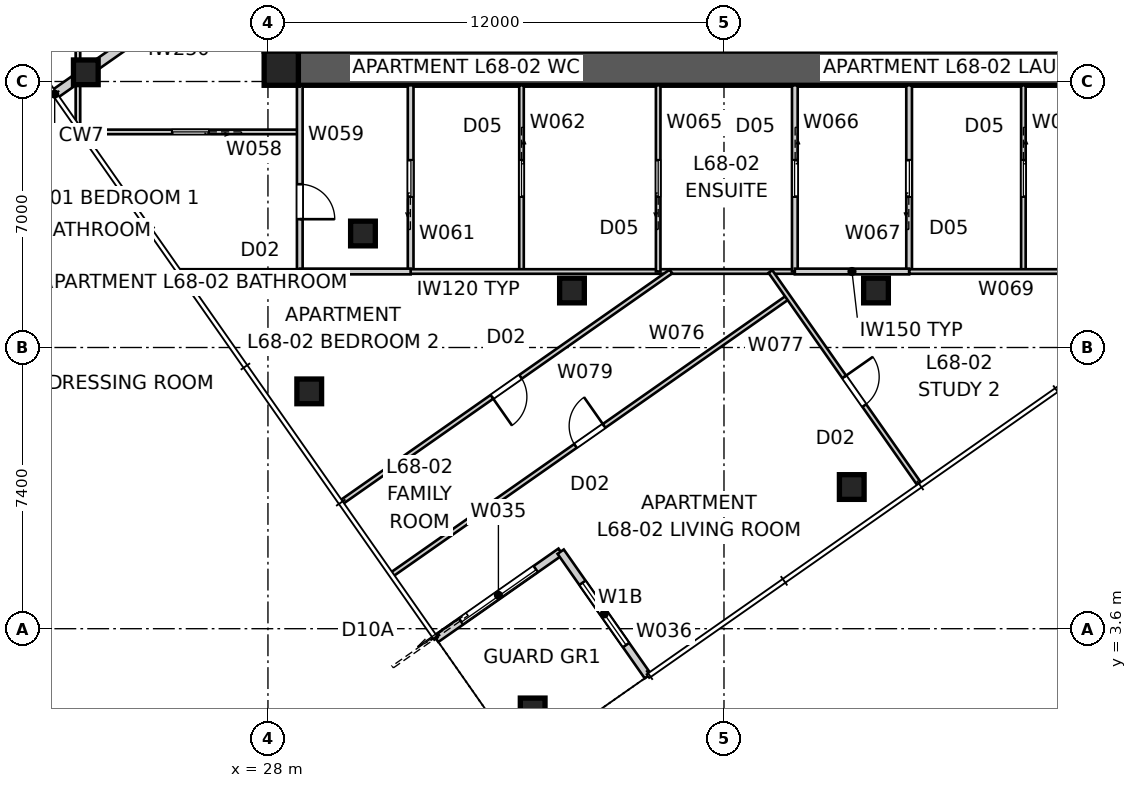
"""IFC4 building model, lengths in metres.
Left out: names, types, materials, properties, quantities, classifications, styles, units other than length and angle.
Written with IfcOpenShell. Run it as: python <this file> out.ifc"""

import sys

from ifc_helpers import new_model, si_unit, direction, frame, frame_2d, origin, origin_2d, place, context, subcontext, project, spatial, polyline, rectangle, outline, extrude, element, fill, save


model = new_model("IFC4")
c1 = context("Model", 3, precision=1e-05, world=origin(), true_north=direction((0.0, 1.0)))
c2 = subcontext(c1, "Body", "Model", "MODEL_VIEW")
j1 = project(units=[si_unit("LENGTHUNIT", "METRE"), si_unit("PLANEANGLEUNIT", "RADIAN")], contexts=[c1])
p1 = place(None, origin())
s1 = spatial("IfcSite", under=j1, at=p1, CompositionType="ELEMENT")
p2 = place(p1, origin())
s2 = spatial("IfcBuilding", under=s1, at=p2, CompositionType="ELEMENT")
p3 = place(p2, frame((0.0, 0.0, 247.2)))
s3 = spatial("IfcBuildingStorey", under=s2, at=p3, CompositionType="ELEMENT", Elevation=247.2)
p4 = place(p3, frame((51.2, 18.35, 0.0), z_axis=(0.0, 0.0, 1.0), x_axis=(-1.0, 0.0, 0.0)))
e1 = element("IfcWall", 1, at=p4, inside=s3, PredefinedType="SHEAR", context=c2, shape_type="SweptSolid", body=[
    extrude(outline(polyline([(0.0, -0.45), (22.4, -0.45), (22.4, -0.025), (22.85, -0.025), (22.85, 0.025), (22.4, 0.025), (22.4, 0.45), (0.0, 0.45), (0.0, 0.025), (-0.45, 0.025), (-0.45, -0.025), (0.0, -0.025), (0.0, -0.45)])), origin(), (0.0, 0.0, 1.0), 3.4),
])
p5 = place(p3, frame((28.35, 41.2, 0.0), z_axis=(0.0, 0.0, 1.0), x_axis=(0.0, -1.0, 0.0)))
e2 = element("IfcWall", 2, at=p5, inside=s3, PredefinedType="SHEAR", context=c2, shape_type="SweptSolid", body=[
    extrude(outline(polyline([(0.0, -0.45), (22.4, -0.45), (22.4, -0.025), (22.85, -0.025), (22.85, 0.025), (22.4, 0.025), (22.4, 0.45), (0.0, 0.45), (0.0, 0.025), (-0.45, 0.025), (-0.45, -0.025), (0.0, -0.025), (0.0, -0.45)])), origin(), (0.0, 0.0, 1.0), 3.4),
])
p6 = place(p5, frame((11.14, 0.0, 0.0)))
e3 = element("IfcOpeningElement", 3, at=p6, cuts=e2, PredefinedType="OPENING", context=c2, shape_type="SweptSolid", body=[
    extrude(rectangle(XDim=1.02, YDim=2.4, at=frame_2d((0.51, 1.2))), frame((0.0, 0.46, 0.0), z_axis=(0.0, -1.0, 0.0), x_axis=(1.0, 0.0, 0.0)), (0.0, 0.0, 1.0), 0.92),
])
p7 = place(p3, frame((28.35, 18.35, 0.0), z_axis=(0.0, 0.0, 1.0), x_axis=(1.0, 0.0, 0.0)))
e4 = element("IfcColumn", 4, at=p7, inside=s3, PredefinedType="COLUMN", context=c2, shape_type="SweptSolid", body=[
    extrude(rectangle(XDim=0.9, YDim=0.9, at=origin_2d()), origin(), (0.0, 0.0, 1.0), 3.4),
])
for number, where, z_axis, x_axis in (
    (5, (34.966, 1.449, 0.0), (0.0, 0.0, 1.0), (1.0, 0.0, 0.0)),
    (6, (43.362, 7.328, 0.0), (0.0, 0.0, 1.0), (1.0, 0.0, 0.0)),
    (7, (23.207, 18.242, 0.0), (0.0, 0.0, 1.0), (1.0, 0.0, 0.0)),
    (8, (29.086, 9.845, 0.0), (0.0, 0.0, 1.0), (1.0, 0.0, 0.0)),
    (9, (30.5, 14.0, 0.0), (0.0, 0.0, 1.0), (1.0, 0.0, 0.0)),
    (10, (36.0, 12.5, 0.0), (0.0, 0.0, 1.0), (1.0, 0.0, 0.0)),
    (11, (44.0, 12.5, 0.0), (0.0, 0.0, 1.0), (1.0, 0.0, 0.0)),
):
    element("IfcColumn", number, at=place(p3, frame(where, z_axis=z_axis, x_axis=x_axis)), inside=s3, PredefinedType="COLUMN", context=c2, shape_type="SweptSolid", body=[
        extrude(rectangle(XDim=0.65, YDim=0.65, at=origin_2d()), origin(), (0.0, 0.0, 1.0), 3.4),
    ])
p8 = place(p3, frame((32.426, 3.333, 0.0), z_axis=(0.0, 0.0, 1.0), x_axis=(0.819165963305, 0.573556557423, 0.0)))
e12 = element("IfcWall", 12, at=p8, inside=s3, PredefinedType="SOLIDWALL", context=c2, shape_type="SweptSolid", body=[
    extrude(rectangle(XDim=4.0, YDim=0.2, at=frame_2d((2.0, 0.0))), origin(), (0.0, 0.0, 1.0), 3.25),
])
p9 = place(p8, frame((0.8, 0.0, 0.0)))
e13 = element("IfcOpeningElement", 13, at=p9, cuts=e12, PredefinedType="OPENING", context=c2, shape_type="SweptSolid", body=[
    extrude(rectangle(XDim=2.4, YDim=2.1, at=frame_2d((1.2, 1.05))), frame((0.0, 0.11, 0.0), z_axis=(0.0, -1.0, 0.0), x_axis=(1.0, 0.0, 0.0)), (0.0, 0.0, 1.0), 0.22),
])
p10 = place(p3, frame((35.702, 5.627, 0.0), z_axis=(0.0, 0.0, 1.0), x_axis=(0.573597512525, -0.819137286189, 0.0)))
e14 = element("IfcWall", 14, at=p10, inside=s3, PredefinedType="SOLIDWALL", context=c2, shape_type="SweptSolid", body=[
    extrude(rectangle(XDim=4.0, YDim=0.2, at=frame_2d((2.0, 0.0))), origin(), (0.0, 0.0, 1.0), 3.25),
])
p11 = place(p10, frame((1.0, 0.0, 0.45)))
e15 = element("IfcOpeningElement", 15, at=p11, cuts=e14, PredefinedType="OPENING", context=c2, shape_type="SweptSolid", body=[
    extrude(rectangle(XDim=2.0, YDim=1.8, at=frame_2d((1.0, 0.9))), frame((0.0, 0.11, 0.0), z_axis=(0.0, -1.0, 0.0), x_axis=(1.0, 0.0, 0.0)), (0.0, 0.0, 1.0), 0.22),
])
p12 = place(p3, frame((22.388, 17.668, 0.0), z_axis=(0.0, 0.0, 1.0), x_axis=(0.819161528122, 0.573562891796, 0.0)))
e16 = element("IfcWall", 16, at=p12, inside=s3, PredefinedType="PARTITIONING", context=c2, shape_type="SweptSolid", body=[
    extrude(rectangle(XDim=6.681, YDim=0.25, at=frame_2d((3.341, 0.0))), origin(), (0.0, 0.0, 1.0), 3.25),
])
p13 = place(p3, frame((23.0, 16.864, 0.0), z_axis=(0.0, 0.0, 1.0), x_axis=(0.0, 1.0, 0.0)))
e17 = element("IfcWall", 17, at=p13, inside=s3, PredefinedType="PARTITIONING", context=c2, shape_type="SweptSolid", body=[
    extrude(rectangle(XDim=26.824, YDim=0.12, at=frame_2d((13.412, 0.0))), origin(), (0.0, 0.0, 1.0), 2.55),
])
p14 = place(p13, frame((9.599, 0.0, 0.0)))
e18 = element("IfcOpeningElement", 18, at=p14, cuts=e17, PredefinedType="OPENING", context=c2, shape_type="SweptSolid", body=[
    extrude(rectangle(XDim=0.92, YDim=2.34, at=frame_2d((0.46, 1.17))), frame((0.0, 0.07, 0.0), z_axis=(0.0, -1.0, 0.0), x_axis=(1.0, 0.0, 0.0)), (0.0, 0.0, 1.0), 0.14),
])
p15 = place(p13, frame((17.603, 0.0, 0.0)))
e19 = element("IfcOpeningElement", 19, at=p15, cuts=e17, PredefinedType="OPENING", context=c2, shape_type="SweptSolid", body=[
    extrude(rectangle(XDim=0.92, YDim=2.34, at=frame_2d((0.46, 1.17))), frame((0.0, 0.07, 0.0), z_axis=(0.0, -1.0, 0.0), x_axis=(1.0, 0.0, 0.0)), (0.0, 0.0, 1.0), 0.14),
])
p16 = place(p13, frame((12.806, 0.0, 0.0)))
e20 = element("IfcOpeningElement", 20, at=p16, cuts=e17, PredefinedType="OPENING", context=c2, shape_type="SweptSolid", body=[
    extrude(rectangle(XDim=0.92, YDim=2.34, at=frame_2d((0.46, 1.17))), frame((0.0, 0.07, 0.0), z_axis=(0.0, -1.0, 0.0), x_axis=(1.0, 0.0, 0.0)), (0.0, 0.0, 1.0), 0.14),
])
p17 = place(p3, frame((28.837, 16.673, 0.0), z_axis=(0.0, 0.0, 1.0), x_axis=(-1.0, 0.0, 0.0)))
e21 = element("IfcWall", 21, at=p17, inside=s3, PredefinedType="PARTITIONING", context=c2, shape_type="SweptSolid", body=[
    extrude(rectangle(XDim=5.704, YDim=0.12, at=frame_2d((2.852, 0.0))), origin(), (0.0, 0.0, 1.0), 3.25),
])
p18 = place(p17, frame((2.396, 0.0, 0.0)))
e22 = element("IfcOpeningElement", 22, at=p18, cuts=e21, PredefinedType="OPENING", context=c2, shape_type="SweptSolid", body=[
    extrude(rectangle(XDim=0.96, YDim=2.1, at=frame_2d((0.48, 1.05))), frame((0.0, 0.07, 0.0), z_axis=(0.0, -1.0, 0.0), x_axis=(1.0, 0.0, 0.0)), (0.0, 0.0, 1.0), 0.14),
])
p19 = place(p3, frame((28.837, 17.9, 0.0), z_axis=(0.0, 0.0, 1.0), x_axis=(0.0, -1.0, 0.0)))
e23 = element("IfcWall", 23, at=p19, inside=s3, PredefinedType="SOLIDWALL", context=c2, shape_type="SweptSolid", body=[
    extrude(rectangle(XDim=4.9, YDim=0.15, at=frame_2d((2.45, 0.0))), origin(), (0.0, 0.0, 1.0), 3.25),
])
p20 = place(p19, frame((2.603, 0.0, 0.0)))
e24 = element("IfcOpeningElement", 24, at=p20, cuts=e23, PredefinedType="OPENING", context=c2, shape_type="SweptSolid", body=[
    extrude(rectangle(XDim=0.92, YDim=2.34, at=frame_2d((0.46, 1.17))), frame((0.0, 0.085, 0.0), z_axis=(0.0, -1.0, 0.0), x_axis=(1.0, 0.0, 0.0)), (0.0, 0.0, 1.0), 0.17),
])
p21 = place(p3, frame((28.837, 13.0, 0.0), z_axis=(0.0, 0.0, 1.0), x_axis=(-1.0, 0.0, 0.0)))
e25 = element("IfcWall", 25, at=p21, inside=s3, PredefinedType="PARTITIONING", context=c2, shape_type="SweptSolid", body=[
    extrude(rectangle(XDim=3.132, YDim=0.12, at=frame_2d((1.566, 0.0))), origin(), (0.0, 0.0, 1.0), 3.25),
])
p22 = place(p3, frame((31.755, 13.0, 0.0), z_axis=(0.0, 0.0, 1.0), x_axis=(0.0, 1.0, 0.0)))
e26 = element("IfcWall", 26, at=p22, inside=s3, PredefinedType="SOLIDWALL", context=c2, shape_type="SweptSolid", body=[
    extrude(rectangle(XDim=4.9, YDim=0.15, at=frame_2d((2.45, 0.0))), origin(), (0.0, 0.0, 1.0), 3.25),
])
p23 = place(p22, frame((1.97, 0.0, 0.0)))
e27 = element("IfcOpeningElement", 27, at=p23, cuts=e26, PredefinedType="OPENING", context=c2, shape_type="SweptSolid", body=[
    extrude(rectangle(XDim=0.96, YDim=2.1, at=frame_2d((0.48, 1.05))), frame((0.0, 0.085, 0.0), z_axis=(0.0, -1.0, 0.0), x_axis=(1.0, 0.0, 0.0)), (0.0, 0.0, 1.0), 0.17),
])
p24 = place(p3, frame((34.672, 17.9, 0.0), z_axis=(0.0, 0.0, 1.0), x_axis=(0.0, -1.0, 0.0)))
e28 = element("IfcWall", 28, at=p24, inside=s3, PredefinedType="PARTITIONING", context=c2, shape_type="SweptSolid", body=[
    extrude(rectangle(XDim=4.9, YDim=0.12, at=frame_2d((2.45, 0.0))), origin(), (0.0, 0.0, 1.0), 3.25),
])
p25 = place(p24, frame((1.97, 0.0, 0.0)))
e29 = element("IfcOpeningElement", 29, at=p25, cuts=e28, PredefinedType="OPENING", context=c2, shape_type="SweptSolid", body=[
    extrude(rectangle(XDim=0.96, YDim=2.1, at=frame_2d((0.48, 1.05))), frame((0.0, 0.07, 0.0), z_axis=(0.0, -1.0, 0.0), x_axis=(1.0, 0.0, 0.0)), (0.0, 0.0, 1.0), 0.14),
])
p26 = place(p3, frame((41.865, 13.0, 0.0), z_axis=(0.0, 0.0, 1.0), x_axis=(-1.0, 0.0, 0.0)))
e30 = element("IfcWall", 30, at=p26, inside=s3, PredefinedType="PARTITIONING", context=c2, shape_type="SweptSolid", body=[
    extrude(rectangle(XDim=10.11, YDim=0.12, at=frame_2d((5.055, 0.0))), origin(), (0.0, 0.0, 1.0), 2.55),
])
p27 = place(p3, frame((31.755, 13.0, 0.0), z_axis=(0.0, 0.0, 1.0), x_axis=(-1.0, 0.0, 0.0)))
e31 = element("IfcWall", 31, at=p27, inside=s3, PredefinedType="SOLIDWALL", context=c2, shape_type="SweptSolid", body=[
    extrude(rectangle(XDim=2.917, YDim=0.15, at=frame_2d((1.458, 0.0))), origin(), (0.0, 0.0, 1.0), 3.25),
])
p28 = place(p3, frame((38.268, 13.0, 0.0), z_axis=(0.0, 0.0, 1.0), x_axis=(0.0, 1.0, 0.0)))
e32 = element("IfcWall", 32, at=p28, inside=s3, PredefinedType="PARTITIONING", context=c2, shape_type="SweptSolid", body=[
    extrude(rectangle(XDim=4.9, YDim=0.12, at=frame_2d((2.45, 0.0))), origin(), (0.0, 0.0, 1.0), 3.25),
])
p29 = place(p28, frame((1.97, 0.0, 0.0)))
e33 = element("IfcOpeningElement", 33, at=p29, cuts=e32, PredefinedType="OPENING", context=c2, shape_type="SweptSolid", body=[
    extrude(rectangle(XDim=0.96, YDim=2.1, at=frame_2d((0.48, 1.05))), frame((0.0, 0.07, 0.0), z_axis=(0.0, -1.0, 0.0), x_axis=(1.0, 0.0, 0.0)), (0.0, 0.0, 1.0), 0.14),
])
p30 = place(p3, frame((41.865, 17.9, 0.0), z_axis=(0.0, 0.0, 1.0), x_axis=(0.0, -1.0, 0.0)))
e34 = element("IfcWall", 34, at=p30, inside=s3, PredefinedType="SOLIDWALL", context=c2, shape_type="SweptSolid", body=[
    extrude(rectangle(XDim=4.9, YDim=0.15, at=frame_2d((2.45, 0.0))), origin(), (0.0, 0.0, 1.0), 3.25),
])
p31 = place(p30, frame((1.97, 0.0, 0.0)))
e35 = element("IfcOpeningElement", 35, at=p31, cuts=e34, PredefinedType="OPENING", context=c2, shape_type="SweptSolid", body=[
    extrude(rectangle(XDim=0.96, YDim=2.1, at=frame_2d((0.48, 1.05))), frame((0.0, 0.085, 0.0), z_axis=(0.0, -1.0, 0.0), x_axis=(1.0, 0.0, 0.0)), (0.0, 0.0, 1.0), 0.17),
])
p32 = place(p3, frame((44.871, 13.0, 0.0), z_axis=(0.0, 0.0, 1.0), x_axis=(0.0, 1.0, 0.0)))
e36 = element("IfcWall", 36, at=p32, inside=s3, PredefinedType="SOLIDWALL", context=c2, shape_type="SweptSolid", body=[
    extrude(rectangle(XDim=4.9, YDim=0.15, at=frame_2d((2.45, 0.0))), origin(), (0.0, 0.0, 1.0), 3.25),
])
p33 = place(p32, frame((1.97, 0.0, 0.0)))
e37 = element("IfcOpeningElement", 37, at=p33, cuts=e36, PredefinedType="OPENING", context=c2, shape_type="SweptSolid", body=[
    extrude(rectangle(XDim=0.96, YDim=2.1, at=frame_2d((0.48, 1.05))), frame((0.0, 0.085, 0.0), z_axis=(0.0, -1.0, 0.0), x_axis=(1.0, 0.0, 0.0)), (0.0, 0.0, 1.0), 0.17),
])
p34 = place(p3, frame((47.878, 17.9, 0.0), z_axis=(0.0, 0.0, 1.0), x_axis=(0.0, -1.0, 0.0)))
e38 = element("IfcWall", 38, at=p34, inside=s3, PredefinedType="PARTITIONING", context=c2, shape_type="SweptSolid", body=[
    extrude(rectangle(XDim=4.9, YDim=0.12, at=frame_2d((2.45, 0.0))), origin(), (0.0, 0.0, 1.0), 3.25),
])
p35 = place(p34, frame((1.97, 0.0, 0.0)))
e39 = element("IfcOpeningElement", 39, at=p35, cuts=e38, PredefinedType="OPENING", context=c2, shape_type="SweptSolid", body=[
    extrude(rectangle(XDim=0.96, YDim=2.1, at=frame_2d((0.48, 1.05))), frame((0.0, 0.07, 0.0), z_axis=(0.0, -1.0, 0.0), x_axis=(1.0, 0.0, 0.0)), (0.0, 0.0, 1.0), 0.14),
])
p36 = place(p3, frame((52.109, 13.0, 0.0), z_axis=(0.0, 0.0, 1.0), x_axis=(-1.0, 0.0, 0.0)))
e40 = element("IfcWall", 40, at=p36, inside=s3, PredefinedType="PARTITIONING", context=c2, shape_type="SweptSolid", body=[
    extrude(rectangle(XDim=7.238, YDim=0.12, at=frame_2d((3.619, 0.0))), origin(), (0.0, 0.0, 1.0), 2.55),
])
p37 = place(p36, frame((1.205, 0.0, 0.0)))
e41 = element("IfcOpeningElement", 41, at=p37, cuts=e40, PredefinedType="OPENING", context=c2, shape_type="SweptSolid", body=[
    extrude(rectangle(XDim=0.92, YDim=2.34, at=frame_2d((0.46, 1.17))), frame((0.0, 0.07, 0.0), z_axis=(0.0, -1.0, 0.0), x_axis=(1.0, 0.0, 0.0)), (0.0, 0.0, 1.0), 0.14),
])
p38 = place(p3, frame((44.871, 13.0, 0.0), z_axis=(0.0, 0.0, 1.0), x_axis=(-1.0, 0.0, 0.0)))
e42 = element("IfcWall", 42, at=p38, inside=s3, PredefinedType="SOLIDWALL", context=c2, shape_type="SweptSolid", body=[
    extrude(rectangle(XDim=3.007, YDim=0.15, at=frame_2d((1.503, 0.0))), origin(), (0.0, 0.0, 1.0), 3.25),
])
p39 = place(p3, frame((31.279, 5.04, 0.0), z_axis=(0.0, 0.0, 1.0), x_axis=(0.819155207289, 0.573571919092, 0.0)))
e43 = element("IfcWall", 43, at=p39, inside=s3, PredefinedType="PARTITIONING", context=c2, shape_type="SweptSolid", body=[
    extrude(rectangle(XDim=12.71, YDim=0.12, at=frame_2d((6.355, 0.0))), origin(), (0.0, 0.0, 1.0), 2.717),
])
p40 = place(p39, frame((5.875, 0.0, 0.0)))
e44 = element("IfcOpeningElement", 44, at=p40, cuts=e43, PredefinedType="OPENING", context=c2, shape_type="SweptSolid", body=[
    extrude(rectangle(XDim=0.92, YDim=2.34, at=frame_2d((0.46, 1.17))), frame((0.0, 0.07, 0.0), z_axis=(0.0, -1.0, 0.0), x_axis=(1.0, 0.0, 0.0)), (0.0, 0.0, 1.0), 0.14),
])
p41 = place(p3, frame((41.222, 13.0, 0.0), z_axis=(0.0, 0.0, 1.0), x_axis=(0.57357503053, -0.819153028653, 0.0)))
e45 = element("IfcWall", 45, at=p41, inside=s3, PredefinedType="PARTITIONING", context=c2, shape_type="SweptSolid", body=[
    extrude(rectangle(XDim=6.834, YDim=0.12, at=frame_2d((3.417, 0.0))), origin(), (0.0, 0.0, 1.0), 3.25),
])
p42 = place(p41, frame((3.386, 0.0, 0.0)))
e46 = element("IfcOpeningElement", 46, at=p42, cuts=e45, PredefinedType="OPENING", context=c2, shape_type="SweptSolid", body=[
    extrude(rectangle(XDim=0.92, YDim=2.34, at=frame_2d((0.46, 1.17))), frame((0.0, 0.07, 0.0), z_axis=(0.0, -1.0, 0.0), x_axis=(1.0, 0.0, 0.0)), (0.0, 0.0, 1.0), 0.14),
])
p43 = place(p3, frame((38.604, 13.0, 0.0), z_axis=(0.0, 0.0, 1.0), x_axis=(-0.819123352089, -0.573617410878, 0.0)))
e47 = element("IfcWall", 47, at=p43, inside=s3, PredefinedType="PARTITIONING", context=c2, shape_type="SweptSolid", body=[
    extrude(rectangle(XDim=10.566, YDim=0.12, at=frame_2d((5.283, 0.0))), origin(), (0.0, 0.0, 1.0), 3.25),
])
p44 = place(p43, frame((4.831, 0.0, 0.0)))
e48 = element("IfcOpeningElement", 48, at=p44, cuts=e47, PredefinedType="OPENING", context=c2, shape_type="SweptSolid", body=[
    extrude(rectangle(XDim=0.92, YDim=2.34, at=frame_2d((0.46, 1.17))), frame((0.0, 0.07, 0.0), z_axis=(0.0, -1.0, 0.0), x_axis=(1.0, 0.0, 0.0)), (0.0, 0.0, 1.0), 0.14),
])
p45 = place(p9, origin())
e49 = element("IfcDoor", 49, at=p45, inside=s3, OperationType="SLIDING_TO_LEFT", PredefinedType="DOOR", context=c2, shape_type="SweptSolid", body=[
    extrude(rectangle(XDim=2.4, YDim=2.1, at=frame_2d((1.2, 1.05))), frame((0.0, 0.025, 0.0), z_axis=(0.0, -1.0, 0.0), x_axis=(1.0, 0.0, 0.0)), (0.0, 0.0, 1.0), 0.05),
])
fill(e13, e49)
p46 = place(p11, origin())
e50 = element("IfcWindow", 50, at=p46, inside=s3, PartitioningType="SINGLE_PANEL", PredefinedType="WINDOW", context=c2, shape_type="SweptSolid", body=[
    extrude(rectangle(XDim=2.0, YDim=1.8, at=frame_2d((1.0, 0.9))), frame((0.0, 0.03, 0.0), z_axis=(0.0, -1.0, 0.0), x_axis=(1.0, 0.0, 0.0)), (0.0, 0.0, 1.0), 0.06),
])
fill(e15, e50)
p47 = place(p35, origin())
e51 = element("IfcDoor", 51, at=p47, inside=s3, OperationType="SLIDING_TO_LEFT", PredefinedType="DOOR", context=c2, shape_type="SweptSolid", body=[
    extrude(rectangle(XDim=0.96, YDim=2.1, at=frame_2d((0.48, 1.05))), frame((0.0, 0.025, 0.0), z_axis=(0.0, -1.0, 0.0), x_axis=(1.0, 0.0, 0.0)), (0.0, 0.0, 1.0), 0.05),
])
fill(e39, e51)
p48 = place(p33, origin())
e52 = element("IfcDoor", 52, at=p48, inside=s3, OperationType="SLIDING_TO_LEFT", PredefinedType="DOOR", context=c2, shape_type="SweptSolid", body=[
    extrude(rectangle(XDim=0.96, YDim=2.1, at=frame_2d((0.48, 1.05))), frame((0.0, 0.025, 0.0), z_axis=(0.0, -1.0, 0.0), x_axis=(1.0, 0.0, 0.0)), (0.0, 0.0, 1.0), 0.05),
])
fill(e37, e52)
p49 = place(p42, origin())
e53 = element("IfcDoor", 53, at=p49, inside=s3, OperationType="SINGLE_SWING_LEFT", PredefinedType="DOOR", context=c2, shape_type="SweptSolid", body=[
    extrude(rectangle(XDim=0.92, YDim=2.34, at=frame_2d((0.46, 1.17))), frame((0.0, 0.025, 0.0), z_axis=(0.0, -1.0, 0.0), x_axis=(1.0, 0.0, 0.0)), (0.0, 0.0, 1.0), 0.05),
])
fill(e46, e53)
p50 = place(p31, origin())
e54 = element("IfcDoor", 54, at=p50, inside=s3, OperationType="SLIDING_TO_LEFT", PredefinedType="DOOR", context=c2, shape_type="SweptSolid", body=[
    extrude(rectangle(XDim=0.96, YDim=2.1, at=frame_2d((0.48, 1.05))), frame((0.0, 0.025, 0.0), z_axis=(0.0, -1.0, 0.0), x_axis=(1.0, 0.0, 0.0)), (0.0, 0.0, 1.0), 0.05),
])
fill(e35, e54)
p51 = place(p40, origin())
e55 = element("IfcDoor", 55, at=p51, inside=s3, OperationType="SINGLE_SWING_RIGHT", PredefinedType="DOOR", context=c2, shape_type="SweptSolid", body=[
    extrude(rectangle(XDim=0.92, YDim=2.34, at=frame_2d((0.46, 1.17))), frame((0.0, 0.025, 0.0), z_axis=(0.0, -1.0, 0.0), x_axis=(1.0, 0.0, 0.0)), (0.0, 0.0, 1.0), 0.05),
])
fill(e44, e55)
p52 = place(p29, origin())
e56 = element("IfcDoor", 56, at=p52, inside=s3, OperationType="SLIDING_TO_LEFT", PredefinedType="DOOR", context=c2, shape_type="SweptSolid", body=[
    extrude(rectangle(XDim=0.96, YDim=2.1, at=frame_2d((0.48, 1.05))), frame((0.0, 0.025, 0.0), z_axis=(0.0, -1.0, 0.0), x_axis=(1.0, 0.0, 0.0)), (0.0, 0.0, 1.0), 0.05),
])
fill(e33, e56)
p53 = place(p44, origin())
e57 = element("IfcDoor", 57, at=p53, inside=s3, OperationType="SINGLE_SWING_RIGHT", PredefinedType="DOOR", context=c2, shape_type="SweptSolid", body=[
    extrude(rectangle(XDim=0.92, YDim=2.34, at=frame_2d((0.46, 1.17))), frame((0.0, 0.025, 0.0), z_axis=(0.0, -1.0, 0.0), x_axis=(1.0, 0.0, 0.0)), (0.0, 0.0, 1.0), 0.05),
])
fill(e48, e57)
p54 = place(p25, origin())
e58 = element("IfcDoor", 58, at=p54, inside=s3, OperationType="SLIDING_TO_LEFT", PredefinedType="DOOR", context=c2, shape_type="SweptSolid", body=[
    extrude(rectangle(XDim=0.96, YDim=2.1, at=frame_2d((0.48, 1.05))), frame((0.0, 0.025, 0.0), z_axis=(0.0, -1.0, 0.0), x_axis=(1.0, 0.0, 0.0)), (0.0, 0.0, 1.0), 0.05),
])
fill(e29, e58)
p55 = place(p23, origin())
e59 = element("IfcDoor", 59, at=p55, inside=s3, OperationType="SLIDING_TO_LEFT", PredefinedType="DOOR", context=c2, shape_type="SweptSolid", body=[
    extrude(rectangle(XDim=0.96, YDim=2.1, at=frame_2d((0.48, 1.05))), frame((0.0, 0.025, 0.0), z_axis=(0.0, -1.0, 0.0), x_axis=(1.0, 0.0, 0.0)), (0.0, 0.0, 1.0), 0.05),
])
fill(e27, e59)
p56 = place(p20, origin())
e60 = element("IfcDoor", 60, at=p56, inside=s3, OperationType="SINGLE_SWING_RIGHT", PredefinedType="DOOR", context=c2, shape_type="SweptSolid", body=[
    extrude(rectangle(XDim=0.92, YDim=2.34, at=frame_2d((0.46, 1.17))), frame((0.0, 0.025, 0.0), z_axis=(0.0, -1.0, 0.0), x_axis=(1.0, 0.0, 0.0)), (0.0, 0.0, 1.0), 0.05),
])
fill(e24, e60)
p57 = place(p18, origin())
e61 = element("IfcDoor", 61, at=p57, inside=s3, OperationType="SLIDING_TO_LEFT", PredefinedType="DOOR", context=c2, shape_type="SweptSolid", body=[
    extrude(rectangle(XDim=0.96, YDim=2.1, at=frame_2d((0.48, 1.05))), frame((0.0, 0.025, 0.0), z_axis=(0.0, -1.0, 0.0), x_axis=(1.0, 0.0, 0.0)), (0.0, 0.0, 1.0), 0.05),
])
fill(e22, e61)
save(model, sys.argv[1])
